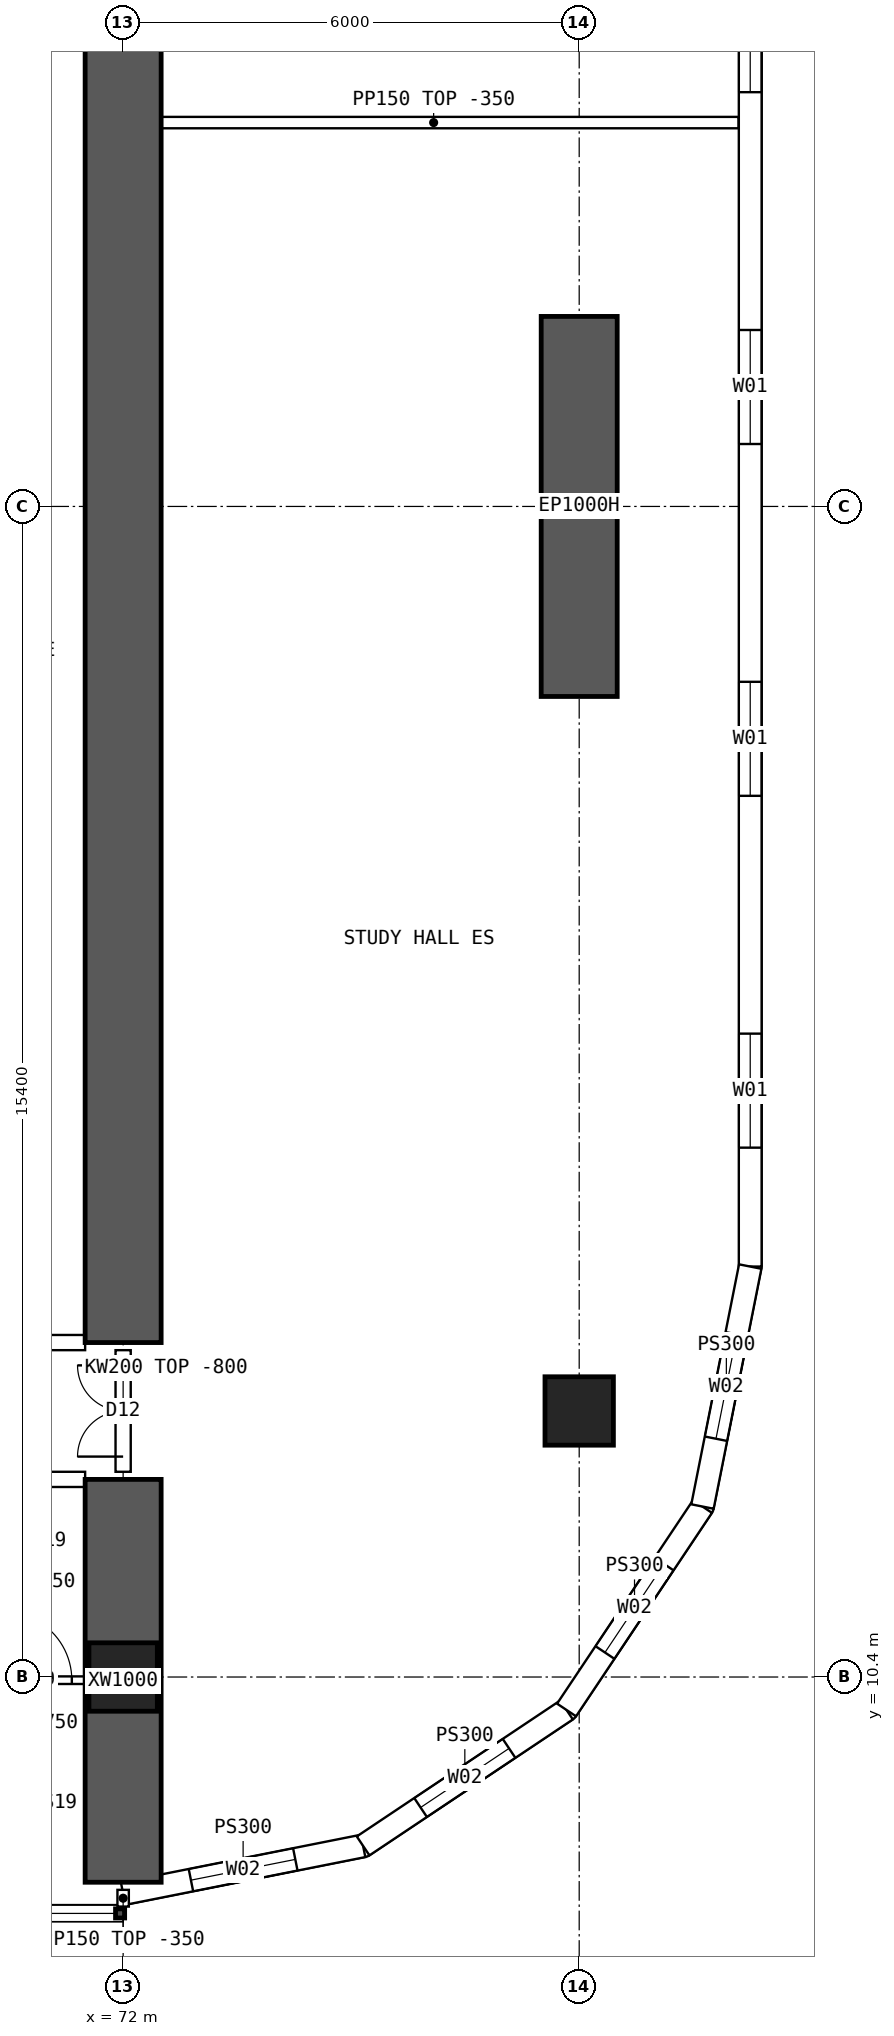
"""IFC4 building model, lengths in metres.
Left out: names, types, materials, properties, quantities, classifications, styles, units other than length and angle.
Written with IfcOpenShell. Run it as: python <this file> out.ifc"""

import sys

from ifc_helpers import new_model, si_unit, direction, frame, frame_2d, origin, origin_2d, place, context, subcontext, project, spatial, polyline, rectangle, hollow_rectangle, outline, extrude, element, fill, save


model = new_model("IFC4")
c1 = context("Model", 3, precision=1e-05, world=origin(), true_north=direction((0.0, 1.0)))
c2 = subcontext(c1, "Body", "Model", "MODEL_VIEW")
j1 = project(units=[si_unit("LENGTHUNIT", "METRE"), si_unit("PLANEANGLEUNIT", "RADIAN")], contexts=[c1])
p1 = place(None, origin())
s1 = spatial("IfcSite", under=j1, at=p1, CompositionType="ELEMENT")
p2 = place(p1, origin())
s2 = spatial("IfcBuilding", under=s1, at=p2, CompositionType="ELEMENT")
p3 = place(p2, frame((0.0, 0.0, 65.2)))
s3 = spatial("IfcBuildingStorey", under=s2, at=p3, CompositionType="ELEMENT", Elevation=65.2)
for number, where, z_axis, x_axis in (
    (1, (72.0, 10.4, 0.0), (0.0, 0.0, 1.0), (1.0, 0.0, 0.0)),
    (2, (78.0, 13.9, 0.0), (0.0, 0.0, 1.0), (1.0, 0.0, 0.0)),
):
    element("IfcColumn", number, at=place(p3, frame(where, z_axis=z_axis, x_axis=x_axis)), inside=s3, PredefinedType="COLUMN", context=c2, shape_type="SweptSolid", body=[
        extrude(hollow_rectangle(XDim=0.9, YDim=0.9, WallThickness=0.09, at=origin_2d()), origin(), (0.0, 0.0, 1.0), 3.75),
    ])
p4 = place(p3, frame((78.0, 23.3, 0.0), z_axis=(0.0, 0.0, 1.0), x_axis=(0.0, 1.0, 0.0)))
e3 = element("IfcWall", 3, at=p4, inside=s3, PredefinedType="SHEAR", context=c2, shape_type="SweptSolid", body=[
    extrude(rectangle(XDim=5.0, YDim=1.0, at=frame_2d((2.5, 0.0))), origin(), (0.0, 0.0, 1.0), 3.75),
])
p5 = place(p3, frame((72.0, 7.7, 0.0), z_axis=(0.0, 0.0, 1.0), x_axis=(0.0, 1.0, 0.0)))
e4 = element("IfcWall", 4, at=p5, inside=s3, PredefinedType="SHEAR", context=c2, shape_type="SweptSolid", body=[
    extrude(rectangle(XDim=5.3, YDim=1.0, at=frame_2d((2.65, 0.0))), origin(), (0.0, 0.0, 1.0), 3.75),
])
p6 = place(p3, frame((72.0, 14.8, 0.0), z_axis=(0.0, 0.0, 1.0), x_axis=(0.0, 1.0, 0.0)))
e5 = element("IfcWall", 5, at=p6, inside=s3, PredefinedType="SHEAR", context=c2, shape_type="SweptSolid", body=[
    extrude(rectangle(XDim=34.4, YDim=1.0, at=frame_2d((17.2, 0.0))), origin(), (0.0, 0.0, 1.0), 3.75),
])
p7 = place(p3, frame((80.25, 15.8, 0.0), z_axis=(0.0, 0.0, 1.0), x_axis=(0.0, 1.0, 0.0)))
e6 = element("IfcWall", 6, at=p7, inside=s3, PredefinedType="SOLIDWALL", context=c2, shape_type="SweptSolid", body=[
    extrude(outline(polyline([(-0.015, -0.15), (32.415, -0.15), (32.385, 0.15), (0.015, 0.15), (-0.015, -0.15)])), origin(), (0.0, 0.0, 1.0), 3.4),
])
p8 = place(p7, frame((1.564, 0.0, 0.9)))
e7 = element("IfcOpeningElement", 7, at=p8, cuts=e6, PredefinedType="OPENING", context=c2, shape_type="SweptSolid", body=[
    extrude(rectangle(XDim=1.5, YDim=2.0, at=frame_2d((0.75, 1.0))), frame((0.0, 0.16, 0.0), z_axis=(0.0, -1.0, 0.0), x_axis=(1.0, 0.0, 0.0)), (0.0, 0.0, 1.0), 0.32),
])
p9 = place(p7, frame((6.193, 0.0, 0.9)))
e8 = element("IfcOpeningElement", 8, at=p9, cuts=e6, PredefinedType="OPENING", context=c2, shape_type="SweptSolid", body=[
    extrude(rectangle(XDim=1.5, YDim=2.0, at=frame_2d((0.75, 1.0))), frame((0.0, 0.16, 0.0), z_axis=(0.0, -1.0, 0.0), x_axis=(1.0, 0.0, 0.0)), (0.0, 0.0, 1.0), 0.32),
])
p10 = place(p7, frame((10.822, 0.0, 0.9)))
e9 = element("IfcOpeningElement", 9, at=p10, cuts=e6, PredefinedType="OPENING", context=c2, shape_type="SweptSolid", body=[
    extrude(rectangle(XDim=1.5, YDim=2.0, at=frame_2d((0.75, 1.0))), frame((0.0, 0.16, 0.0), z_axis=(0.0, -1.0, 0.0), x_axis=(1.0, 0.0, 0.0)), (0.0, 0.0, 1.0), 0.32),
])
p11 = place(p7, frame((15.45, 0.0, 0.9)))
e10 = element("IfcOpeningElement", 10, at=p11, cuts=e6, PredefinedType="OPENING", context=c2, shape_type="SweptSolid", body=[
    extrude(rectangle(XDim=1.5, YDim=2.0, at=frame_2d((0.75, 1.0))), frame((0.0, 0.16, 0.0), z_axis=(0.0, -1.0, 0.0), x_axis=(1.0, 0.0, 0.0)), (0.0, 0.0, 1.0), 0.32),
])
p12 = place(p7, frame((20.079, 0.0, 0.9)))
e11 = element("IfcOpeningElement", 11, at=p12, cuts=e6, PredefinedType="OPENING", context=c2, shape_type="SweptSolid", body=[
    extrude(rectangle(XDim=1.5, YDim=2.0, at=frame_2d((0.75, 1.0))), frame((0.0, 0.16, 0.0), z_axis=(0.0, -1.0, 0.0), x_axis=(1.0, 0.0, 0.0)), (0.0, 0.0, 1.0), 0.32),
])
p13 = place(p7, frame((24.707, 0.0, 0.9)))
e12 = element("IfcOpeningElement", 12, at=p13, cuts=e6, PredefinedType="OPENING", context=c2, shape_type="SweptSolid", body=[
    extrude(rectangle(XDim=1.5, YDim=2.0, at=frame_2d((0.75, 1.0))), frame((0.0, 0.16, 0.0), z_axis=(0.0, -1.0, 0.0), x_axis=(1.0, 0.0, 0.0)), (0.0, 0.0, 1.0), 0.32),
])
p14 = place(p7, frame((29.336, 0.0, 0.9)))
e13 = element("IfcOpeningElement", 13, at=p14, cuts=e6, PredefinedType="OPENING", context=c2, shape_type="SweptSolid", body=[
    extrude(rectangle(XDim=1.5, YDim=2.0, at=frame_2d((0.75, 1.0))), frame((0.0, 0.16, 0.0), z_axis=(0.0, -1.0, 0.0), x_axis=(1.0, 0.0, 0.0)), (0.0, 0.0, 1.0), 0.32),
])
p15 = place(p3, frame((72.0, 7.55, 0.0), z_axis=(0.0, 0.0, 1.0), x_axis=(0.980787251524, 0.195080412259, 0.0)))
e14 = element("IfcWall", 14, at=p15, inside=s3, PredefinedType="SOLIDWALL", context=c2, shape_type="SweptSolid", body=[
    extrude(outline(polyline([(-0.03, -0.15), (3.249, -0.15), (3.189, 0.15), (0.03, 0.15), (-0.03, -0.15)])), origin(), (0.0, 0.0, 1.0), 3.4),
])
p16 = place(p15, frame((0.909, 0.0, 0.9)))
e15 = element("IfcOpeningElement", 15, at=p16, cuts=e14, PredefinedType="OPENING", context=c2, shape_type="SweptSolid", body=[
    extrude(rectangle(XDim=1.4, YDim=1.8, at=frame_2d((0.7, 0.9))), frame((0.0, 0.16, 0.0), z_axis=(0.0, -1.0, 0.0), x_axis=(1.0, 0.0, 0.0)), (0.0, 0.0, 1.0), 0.32),
])
p17 = place(p3, frame((75.157, 8.178, 0.0), z_axis=(0.0, 0.0, 1.0), x_axis=(0.831478105043, 0.555557522525, 0.0)))
e16 = element("IfcWall", 16, at=p17, inside=s3, PredefinedType="SOLIDWALL", context=c2, shape_type="SweptSolid", body=[
    extrude(outline(polyline([(-0.03, -0.15), (3.249, -0.15), (3.189, 0.15), (0.03, 0.15), (-0.03, -0.15)])), origin(), (0.0, 0.0, 1.0), 3.4),
])
p18 = place(p17, frame((0.909, 0.0, 0.9)))
e17 = element("IfcOpeningElement", 17, at=p18, cuts=e16, PredefinedType="OPENING", context=c2, shape_type="SweptSolid", body=[
    extrude(rectangle(XDim=1.4, YDim=1.8, at=frame_2d((0.7, 0.9))), frame((0.0, 0.16, 0.0), z_axis=(0.0, -1.0, 0.0), x_axis=(1.0, 0.0, 0.0)), (0.0, 0.0, 1.0), 0.32),
])
p19 = place(p3, frame((77.833, 9.966, 0.0), z_axis=(0.0, 0.0, 1.0), x_axis=(0.555609954424, 0.831443069936, 0.0)))
e18 = element("IfcWall", 18, at=p19, inside=s3, PredefinedType="SOLIDWALL", context=c2, shape_type="SweptSolid", body=[
    extrude(outline(polyline([(-0.03, -0.15), (3.249, -0.15), (3.189, 0.15), (0.03, 0.15), (-0.03, -0.15)])), origin(), (0.0, 0.0, 1.0), 3.4),
])
p20 = place(p19, frame((0.909, 0.0, 0.9)))
e19 = element("IfcOpeningElement", 19, at=p20, cuts=e18, PredefinedType="OPENING", context=c2, shape_type="SweptSolid", body=[
    extrude(rectangle(XDim=1.4, YDim=1.8, at=frame_2d((0.7, 0.9))), frame((0.0, 0.16, 0.0), z_axis=(0.0, -1.0, 0.0), x_axis=(1.0, 0.0, 0.0)), (0.0, 0.0, 1.0), 0.32),
])
p21 = place(p3, frame((79.622, 12.643, 0.0), z_axis=(0.0, 0.0, 1.0), x_axis=(0.195065901187, 0.980790137692, 0.0)))
e20 = element("IfcWall", 20, at=p21, inside=s3, PredefinedType="SOLIDWALL", context=c2, shape_type="SweptSolid", body=[
    extrude(outline(polyline([(-0.03, -0.15), (3.234, -0.15), (3.204, 0.15), (0.03, 0.15), (-0.03, -0.15)])), origin(), (0.0, 0.0, 1.0), 3.4),
])
p22 = place(p21, frame((0.909, 0.0, 0.9)))
e21 = element("IfcOpeningElement", 21, at=p22, cuts=e20, PredefinedType="OPENING", context=c2, shape_type="SweptSolid", body=[
    extrude(rectangle(XDim=1.4, YDim=1.8, at=frame_2d((0.7, 0.9))), frame((0.0, 0.16, 0.0), z_axis=(0.0, -1.0, 0.0), x_axis=(1.0, 0.0, 0.0)), (0.0, 0.0, 1.0), 0.32),
])
p23 = place(p3, frame((66.5, 13.0, 0.0), z_axis=(0.0, 0.0, 1.0), x_axis=(1.0, 0.0, 0.0)))
e22 = element("IfcWall", 22, at=p23, inside=s3, PredefinedType="SOLIDWALL", context=c2, shape_type="SweptSolid", body=[
    extrude(outline(polyline([(0.0, 0.0), (5.0, 0.0), (5.0, 3.0), (0.0, 3.0), (0.0, 0.0)])), frame((0.0, 0.1, 0.0), z_axis=(0.0, -1.0, 0.0), x_axis=(1.0, 0.0, 0.0)), (0.0, 0.0, 1.0), 0.2),
])
p24 = place(p23, frame((1.3, 0.0, 0.0)))
e23 = element("IfcOpeningElement", 23, at=p24, cuts=e22, PredefinedType="OPENING", context=c2, shape_type="SweptSolid", body=[
    extrude(rectangle(XDim=0.9, YDim=2.1, at=frame_2d((0.45, 1.05))), frame((0.0, 0.11, 0.0), z_axis=(0.0, -1.0, 0.0), x_axis=(1.0, 0.0, 0.0)), (0.0, 0.0, 1.0), 0.22),
])
p25 = place(p23, frame((2.675, 0.0, 0.0)))
e24 = element("IfcOpeningElement", 24, at=p25, cuts=e22, PredefinedType="OPENING", context=c2, shape_type="SweptSolid", body=[
    extrude(rectangle(XDim=0.9, YDim=2.1, at=frame_2d((0.45, 1.05))), frame((0.0, 0.11, 0.0), z_axis=(0.0, -1.0, 0.0), x_axis=(1.0, 0.0, 0.0)), (0.0, 0.0, 1.0), 0.22),
])
p26 = place(p3, frame((66.5, 14.8, 0.0), z_axis=(0.0, 0.0, 1.0), x_axis=(1.0, 0.0, 0.0)))
e25 = element("IfcWall", 25, at=p26, inside=s3, PredefinedType="SOLIDWALL", context=c2, shape_type="SweptSolid", body=[
    extrude(rectangle(XDim=5.0, YDim=0.2, at=frame_2d((2.5, 0.0))), origin(), (0.0, 0.0, 1.0), 3.4),
])
p27 = place(p26, frame((0.2, 0.0, 0.0)))
e26 = element("IfcOpeningElement", 26, at=p27, cuts=e25, PredefinedType="OPENING", context=c2, shape_type="SweptSolid", body=[
    extrude(rectangle(XDim=1.6, YDim=2.1, at=frame_2d((0.8, 1.05))), frame((0.0, 0.11, 0.0), z_axis=(0.0, -1.0, 0.0), x_axis=(1.0, 0.0, 0.0)), (0.0, 0.0, 1.0), 0.22),
])
p28 = place(p3, frame((71.55, 10.358, 0.0), z_axis=(0.0, 0.0, 1.0), x_axis=(-1.0, 0.0, 0.0)))
e27 = element("IfcWall", 27, at=p28, inside=s3, PredefinedType="PARTITIONING", context=c2, shape_type="SweptSolid", body=[
    extrude(outline(polyline([(0.0, 0.0), (1.3, 0.0), (1.3, 3.0), (0.0, 3.0), (0.0, 0.0)])), frame((0.0, 0.05, 0.0), z_axis=(0.0, -1.0, 0.0), x_axis=(1.0, 0.0, 0.0)), (0.0, 0.0, 1.0), 0.1),
])
p29 = place(p28, frame((0.225, 0.0, 0.0)))
e28 = element("IfcOpeningElement", 28, at=p29, cuts=e27, PredefinedType="OPENING", context=c2, shape_type="SweptSolid", body=[
    extrude(rectangle(XDim=0.9, YDim=2.1, at=frame_2d((0.45, 1.05))), frame((0.0, 0.06, 0.0), z_axis=(0.0, -1.0, 0.0), x_axis=(1.0, 0.0, 0.0)), (0.0, 0.0, 1.0), 0.12),
])
p30 = place(p3, frame((72.075, 30.85, 0.0), z_axis=(0.0, 0.0, 1.0), x_axis=(1.0, 0.0, 0.0)))
e29 = element("IfcWall", 29, at=p30, inside=s3, PredefinedType="PARTITIONING", context=c2, shape_type="SweptSolid", body=[
    extrude(outline(polyline([(0.0, 0.0), (8.02, 0.0), (8.02, 3.4), (6.227, 3.4), (6.225, 2.95), (5.627, 2.95), (5.625, 3.4), (0.0, 3.4), (0.0, 0.0)])), frame((0.0, 0.075, 0.0), z_axis=(0.0, -1.0, 0.0), x_axis=(1.0, 0.0, 0.0)), (0.0, 0.0, 1.0), 0.15),
])
p31 = place(p3, frame((72.0, 13.1, 0.0), z_axis=(0.0, 0.0, 1.0), x_axis=(0.0, 1.0, 0.0)))
e30 = element("IfcWall", 30, at=p31, inside=s3, PredefinedType="SOLIDWALL", context=c2, shape_type="SweptSolid", body=[
    extrude(outline(polyline([(0.0, 0.0), (1.6, 0.0), (1.6, 2.95), (0.0, 2.95), (0.0, 0.0)])), frame((0.0, 0.1, 0.0), z_axis=(0.0, -1.0, 0.0), x_axis=(1.0, 0.0, 0.0)), (0.0, 0.0, 1.0), 0.2),
])
p32 = place(p31, frame((0.2, 0.0, 0.0)))
e31 = element("IfcOpeningElement", 31, at=p32, cuts=e30, PredefinedType="OPENING", context=c2, shape_type="SweptSolid", body=[
    extrude(rectangle(XDim=1.2, YDim=2.1, at=frame_2d((0.6, 1.05))), frame((0.0, 0.11, 0.0), z_axis=(0.0, -1.0, 0.0), x_axis=(1.0, 0.0, 0.0)), (0.0, 0.0, 1.0), 0.22),
])
p33 = place(p3, frame((72.0, 7.6, 0.0), z_axis=(0.0, 0.0, 1.0), x_axis=(0.0, -1.0, 0.0)))
e32 = element("IfcWall", 32, at=p33, inside=s3, PredefinedType="PARTITIONING", context=c2, shape_type="SweptSolid", body=[
    extrude(rectangle(XDim=0.22, YDim=0.15, at=frame_2d((0.11, 0.0))), origin(), (0.0, 0.0, 1.0), 3.4),
])
p34 = place(p8, origin())
e33 = element("IfcWindow", 33, at=p34, inside=s3, PartitioningType="SINGLE_PANEL", PredefinedType="WINDOW", context=c2, shape_type="SweptSolid", body=[
    extrude(rectangle(XDim=1.5, YDim=2.0, at=frame_2d((0.75, 1.0))), frame((0.0, 0.03, 0.0), z_axis=(0.0, -1.0, 0.0), x_axis=(1.0, 0.0, 0.0)), (0.0, 0.0, 1.0), 0.06),
])
fill(e7, e33)
p35 = place(p9, origin())
e34 = element("IfcWindow", 34, at=p35, inside=s3, PartitioningType="SINGLE_PANEL", PredefinedType="WINDOW", context=c2, shape_type="SweptSolid", body=[
    extrude(rectangle(XDim=1.5, YDim=2.0, at=frame_2d((0.75, 1.0))), frame((0.0, 0.03, 0.0), z_axis=(0.0, -1.0, 0.0), x_axis=(1.0, 0.0, 0.0)), (0.0, 0.0, 1.0), 0.06),
])
fill(e8, e34)
p36 = place(p10, origin())
e35 = element("IfcWindow", 35, at=p36, inside=s3, PartitioningType="SINGLE_PANEL", PredefinedType="WINDOW", context=c2, shape_type="SweptSolid", body=[
    extrude(rectangle(XDim=1.5, YDim=2.0, at=frame_2d((0.75, 1.0))), frame((0.0, 0.03, 0.0), z_axis=(0.0, -1.0, 0.0), x_axis=(1.0, 0.0, 0.0)), (0.0, 0.0, 1.0), 0.06),
])
fill(e9, e35)
p37 = place(p11, origin())
e36 = element("IfcWindow", 36, at=p37, inside=s3, PartitioningType="SINGLE_PANEL", PredefinedType="WINDOW", context=c2, shape_type="SweptSolid", body=[
    extrude(rectangle(XDim=1.5, YDim=2.0, at=frame_2d((0.75, 1.0))), frame((0.0, 0.03, 0.0), z_axis=(0.0, -1.0, 0.0), x_axis=(1.0, 0.0, 0.0)), (0.0, 0.0, 1.0), 0.06),
])
fill(e10, e36)
p38 = place(p16, origin())
e37 = element("IfcWindow", 37, at=p38, inside=s3, PartitioningType="SINGLE_PANEL", PredefinedType="WINDOW", context=c2, shape_type="SweptSolid", body=[
    extrude(rectangle(XDim=1.4, YDim=1.8, at=frame_2d((0.7, 0.9))), frame((0.0, 0.03, 0.0), z_axis=(0.0, -1.0, 0.0), x_axis=(1.0, 0.0, 0.0)), (0.0, 0.0, 1.0), 0.06),
])
fill(e15, e37)
p39 = place(p18, origin())
e38 = element("IfcWindow", 38, at=p39, inside=s3, PartitioningType="SINGLE_PANEL", PredefinedType="WINDOW", context=c2, shape_type="SweptSolid", body=[
    extrude(rectangle(XDim=1.4, YDim=1.8, at=frame_2d((0.7, 0.9))), frame((0.0, 0.03, 0.0), z_axis=(0.0, -1.0, 0.0), x_axis=(1.0, 0.0, 0.0)), (0.0, 0.0, 1.0), 0.06),
])
fill(e17, e38)
p40 = place(p20, origin())
e39 = element("IfcWindow", 39, at=p40, inside=s3, PartitioningType="SINGLE_PANEL", PredefinedType="WINDOW", context=c2, shape_type="SweptSolid", body=[
    extrude(rectangle(XDim=1.4, YDim=1.8, at=frame_2d((0.7, 0.9))), frame((0.0, 0.03, 0.0), z_axis=(0.0, -1.0, 0.0), x_axis=(1.0, 0.0, 0.0)), (0.0, 0.0, 1.0), 0.06),
])
fill(e19, e39)
p41 = place(p22, origin())
e40 = element("IfcWindow", 40, at=p41, inside=s3, PartitioningType="SINGLE_PANEL", PredefinedType="WINDOW", context=c2, shape_type="SweptSolid", body=[
    extrude(rectangle(XDim=1.4, YDim=1.8, at=frame_2d((0.7, 0.9))), frame((0.0, 0.03, 0.0), z_axis=(0.0, -1.0, 0.0), x_axis=(1.0, 0.0, 0.0)), (0.0, 0.0, 1.0), 0.06),
])
fill(e21, e40)
p42 = place(p29, origin())
e41 = element("IfcDoor", 41, at=p42, inside=s3, OperationType="SINGLE_SWING_RIGHT", PredefinedType="DOOR", context=c2, shape_type="SweptSolid", body=[
    extrude(rectangle(XDim=0.9, YDim=2.1, at=frame_2d((0.45, 1.05))), frame((0.0, 0.025, 0.0), z_axis=(0.0, -1.0, 0.0), x_axis=(1.0, 0.0, 0.0)), (0.0, 0.0, 1.0), 0.05),
])
fill(e28, e41)
p43 = place(p32, origin())
e42 = element("IfcDoor", 42, at=p43, inside=s3, OperationType="DOUBLE_DOOR_SINGLE_SWING", PredefinedType="DOOR", context=c2, shape_type="SweptSolid", body=[
    extrude(rectangle(XDim=1.2, YDim=2.1, at=frame_2d((0.6, 1.05))), frame((0.0, 0.025, 0.0), z_axis=(0.0, -1.0, 0.0), x_axis=(1.0, 0.0, 0.0)), (0.0, 0.0, 1.0), 0.05),
])
fill(e31, e42)
save(model, sys.argv[1])
